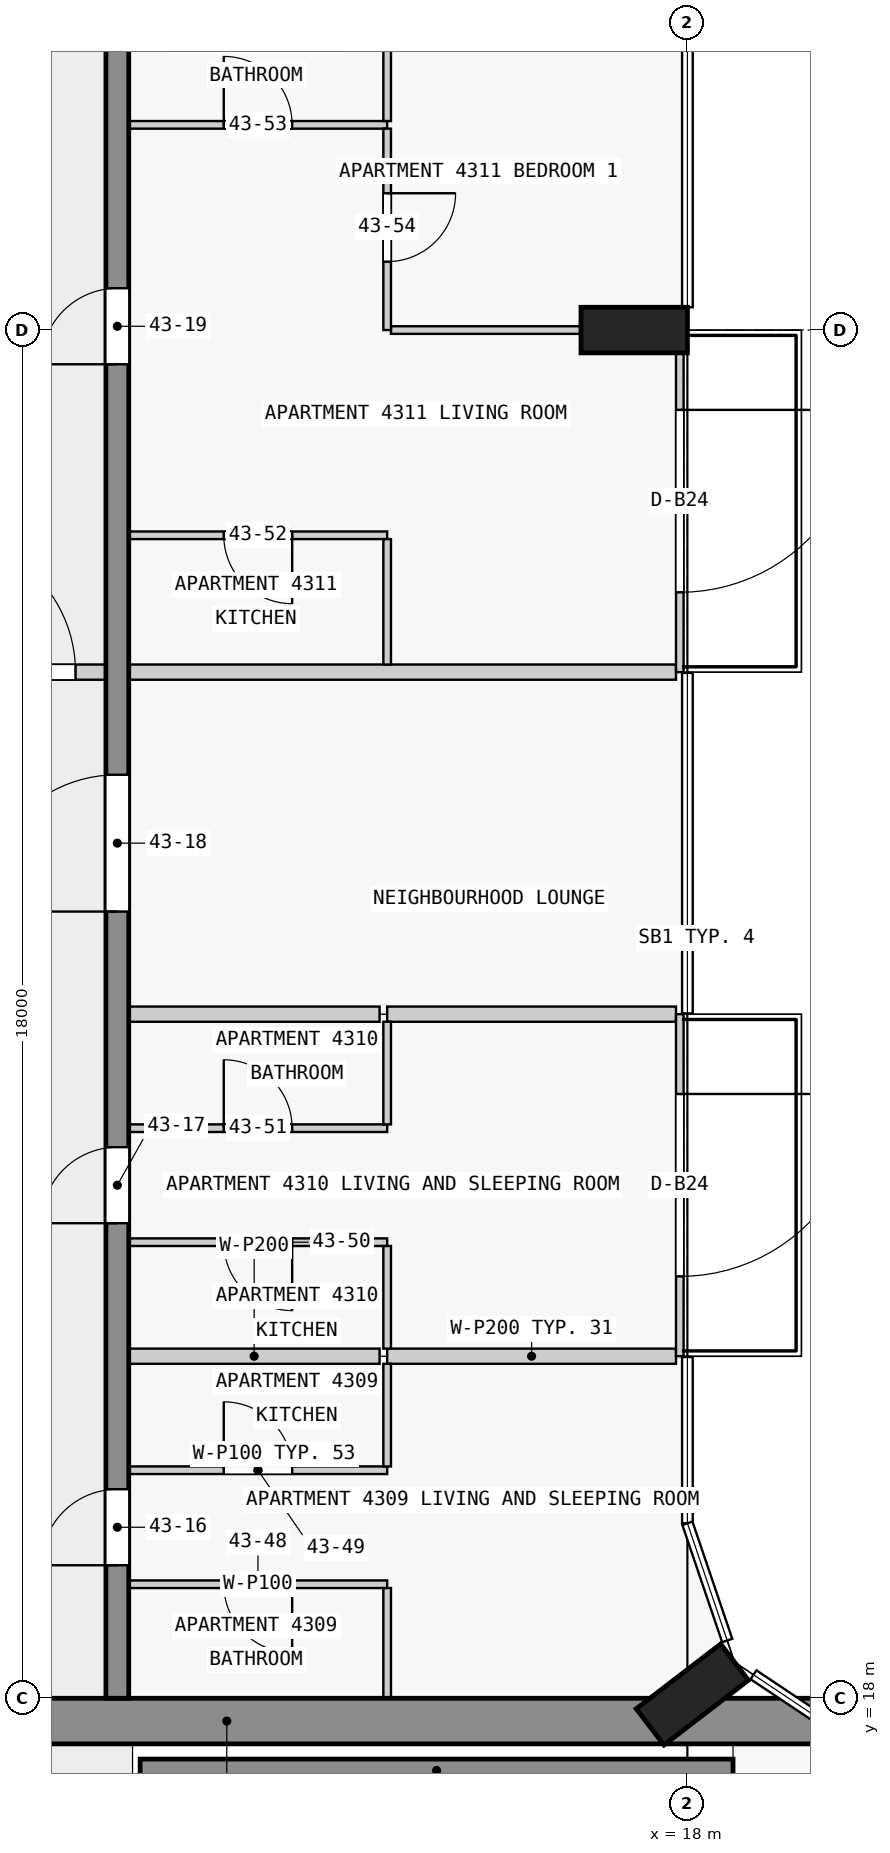
"""IFC4 building model, lengths in metres.
Left out: names, types, materials, properties, quantities, classifications, styles, units other than length and angle.
Written with IfcOpenShell. Run it as: python <this file> out.ifc"""

import sys

from ifc_helpers import new_model, si_unit, direction, frame, frame_2d, origin, origin_2d, place, context, subcontext, project, spatial, rectangle, extrude, element, fill, save


model = new_model("IFC4")
c1 = context("Model", 3, precision=1e-05, world=origin(), true_north=direction((0.0, 1.0)))
c2 = subcontext(c1, "Body", "Model", "MODEL_VIEW")
j1 = project(units=[si_unit("LENGTHUNIT", "METRE"), si_unit("PLANEANGLEUNIT", "RADIAN")], contexts=[c1])
p1 = place(None, origin())
s1 = spatial("IfcSite", under=j1, at=p1, CompositionType="ELEMENT")
p2 = place(p1, origin())
s2 = spatial("IfcBuilding", under=s1, at=p2, CompositionType="ELEMENT")
p3 = place(p2, frame((0.0, 0.0, 167.4)))
s3 = spatial("IfcBuildingStorey", under=s2, at=p3, CompositionType="ELEMENT", Elevation=167.4)
for number, where, z_axis, x_axis in (
    (1, (18.065, 18.05, 0.0), (0.0, 0.0, 1.0), (-0.609, 0.793, 0.0)),
    (2, (17.3, 36.0, 0.0), (0.0, 0.0, 1.0), (0.0, 1.0, 0.0)),
):
    element("IfcColumn", number, at=place(p3, frame(where, z_axis=z_axis, x_axis=x_axis)), inside=s3, PredefinedType="COLUMN", context=c2, shape_type="SweptSolid", body=[
        extrude(rectangle(XDim=0.6, YDim=1.4, at=origin_2d()), origin(), (0.0, 0.0, 1.0), 3.5),
    ])
p4 = place(p3, frame((1.38, 17.7, 0.0), z_axis=(0.0, 0.0, 1.0), x_axis=(1.0, 0.0, 0.0)))
e3 = element("IfcWall", 3, at=p4, inside=s3, PredefinedType="SHEAR", context=c2, shape_type="SweptSolid", body=[
    extrude(rectangle(XDim=21.12, YDim=0.6, at=frame_2d((10.56, 0.0))), origin(), (0.0, 0.0, 1.0), 3.25),
])
p5 = place(p4, frame((6.4, 0.0, 0.0)))
e4 = element("IfcOpeningElement", 4, at=p5, cuts=e3, PredefinedType="OPENING", context=c2, shape_type="SweptSolid", body=[
    extrude(rectangle(XDim=1.8, YDim=2.1, at=frame_2d((0.9, 1.05))), frame((0.0, 0.31, 0.0), z_axis=(0.0, -1.0, 0.0), x_axis=(1.0, 0.0, 0.0)), (0.0, 0.0, 1.0), 0.62),
])
p6 = place(p3, frame((10.8, 17.05, 0.0), z_axis=(0.0, 0.0, 1.0), x_axis=(1.0, 0.0, 0.0)))
e5 = element("IfcWall", 5, at=p6, inside=s3, PredefinedType="SHEAR", context=c2, shape_type="SweptSolid", body=[
    extrude(rectangle(XDim=7.8, YDim=0.3, at=frame_2d((3.9, 0.0))), origin(), (0.0, 0.0, 1.0), 3.25),
])
p7 = place(p3, frame((10.5, 18.0, 0.0), z_axis=(0.0, 0.0, 1.0), x_axis=(0.0, 1.0, 0.0)))
e6 = element("IfcWall", 6, at=p7, inside=s3, PredefinedType="SHEAR", context=c2, shape_type="SweptSolid", body=[
    extrude(rectangle(XDim=27.0, YDim=0.3, at=frame_2d((13.5, 0.0))), origin(), (0.0, 0.0, 1.0), 3.25),
])
p8 = place(p7, frame((1.75, 0.0, 0.0)))
e7 = element("IfcOpeningElement", 7, at=p8, cuts=e6, PredefinedType="OPENING", context=c2, shape_type="SweptSolid", body=[
    extrude(rectangle(XDim=1.0, YDim=2.1, at=frame_2d((0.5, 1.05))), frame((0.0, 0.16, 0.0), z_axis=(0.0, -1.0, 0.0), x_axis=(1.0, 0.0, 0.0)), (0.0, 0.0, 1.0), 0.32),
])
p9 = place(p7, frame((6.25, 0.0, 0.0)))
e8 = element("IfcOpeningElement", 8, at=p9, cuts=e6, PredefinedType="OPENING", context=c2, shape_type="SweptSolid", body=[
    extrude(rectangle(XDim=1.0, YDim=2.1, at=frame_2d((0.5, 1.05))), frame((0.0, 0.16, 0.0), z_axis=(0.0, -1.0, 0.0), x_axis=(1.0, 0.0, 0.0)), (0.0, 0.0, 1.0), 0.32),
])
p10 = place(p7, frame((10.35, 0.0, 0.0)))
e9 = element("IfcOpeningElement", 9, at=p10, cuts=e6, PredefinedType="OPENING", context=c2, shape_type="SweptSolid", body=[
    extrude(rectangle(XDim=1.8, YDim=2.1, at=frame_2d((0.9, 1.05))), frame((0.0, 0.16, 0.0), z_axis=(0.0, -1.0, 0.0), x_axis=(1.0, 0.0, 0.0)), (0.0, 0.0, 1.0), 0.32),
])
p11 = place(p7, frame((17.55, 0.0, 0.0)))
e10 = element("IfcOpeningElement", 10, at=p11, cuts=e6, PredefinedType="OPENING", context=c2, shape_type="SweptSolid", body=[
    extrude(rectangle(XDim=1.0, YDim=2.1, at=frame_2d((0.5, 1.05))), frame((0.0, 0.16, 0.0), z_axis=(0.0, -1.0, 0.0), x_axis=(1.0, 0.0, 0.0)), (0.0, 0.0, 1.0), 0.32),
])
p12 = place(p7, frame((23.25, 0.0, 0.0)))
e11 = element("IfcOpeningElement", 11, at=p12, cuts=e6, PredefinedType="OPENING", context=c2, shape_type="SweptSolid", body=[
    extrude(rectangle(XDim=0.9, YDim=2.1, at=frame_2d((0.45, 1.05))), frame((0.0, 0.16, 0.0), z_axis=(0.0, -1.0, 0.0), x_axis=(1.0, 0.0, 0.0)), (0.0, 0.0, 1.0), 0.32),
])
p13 = place(p7, frame((25.45, 0.0, 0.0)))
e12 = element("IfcOpeningElement", 12, at=p13, cuts=e6, PredefinedType="OPENING", context=c2, shape_type="SweptSolid", body=[
    extrude(rectangle(XDim=1.0, YDim=2.1, at=frame_2d((0.5, 1.05))), frame((0.0, 0.16, 0.0), z_axis=(0.0, -1.0, 0.0), x_axis=(1.0, 0.0, 0.0)), (0.0, 0.0, 1.0), 0.32),
])
p14 = place(p3, frame((17.9, 27.0, 0.0), z_axis=(0.0, 0.0, 1.0), x_axis=(0.0, -1.0, 0.0)))
e13 = element("IfcWall", 13, at=p14, inside=s3, PredefinedType="STANDARD", context=c2, shape_type="SweptSolid", body=[
    extrude(rectangle(XDim=4.5, YDim=0.1, at=frame_2d((2.25, 0.0))), origin(), (0.0, 0.0, 1.0), 3.25),
])
p15 = place(p14, frame((1.05, 0.0, 0.0)))
e14 = element("IfcOpeningElement", 14, at=p15, cuts=e13, PredefinedType="OPENING", context=c2, shape_type="SweptSolid", body=[
    extrude(rectangle(XDim=2.4, YDim=2.4, at=frame_2d((1.2, 1.2))), frame((0.0, 0.06, 0.0), z_axis=(0.0, -1.0, 0.0), x_axis=(1.0, 0.0, 0.0)), (0.0, 0.0, 1.0), 0.12),
])
p16 = place(p3, frame((17.9, 36.0, 0.0), z_axis=(0.0, 0.0, 1.0), x_axis=(0.0, -1.0, 0.0)))
e15 = element("IfcWall", 15, at=p16, inside=s3, PredefinedType="STANDARD", context=c2, shape_type="SweptSolid", body=[
    extrude(rectangle(XDim=4.5, YDim=0.1, at=frame_2d((2.25, 0.0))), origin(), (0.0, 0.0, 1.0), 3.25),
])
p17 = place(p16, frame((1.05, 0.0, 0.0)))
e16 = element("IfcOpeningElement", 16, at=p17, cuts=e15, PredefinedType="OPENING", context=c2, shape_type="SweptSolid", body=[
    extrude(rectangle(XDim=2.4, YDim=2.4, at=frame_2d((1.2, 1.2))), frame((0.0, 0.06, 0.0), z_axis=(0.0, -1.0, 0.0), x_axis=(1.0, 0.0, 0.0)), (0.0, 0.0, 1.0), 0.12),
])
p18 = place(p3, frame((14.05, 19.5, 0.0), z_axis=(0.0, 0.0, 1.0), x_axis=(-1.0, 0.0, 0.0)))
e17 = element("IfcWall", 17, at=p18, inside=s3, PredefinedType="PARTITIONING", context=c2, shape_type="SweptSolid", body=[
    extrude(rectangle(XDim=3.4, YDim=0.1, at=frame_2d((1.7, 0.0))), origin(), (0.0, 0.0, 1.0), 3.25),
])
p19 = place(p18, frame((1.25, 0.0, 0.0)))
e18 = element("IfcOpeningElement", 18, at=p19, cuts=e17, PredefinedType="OPENING", context=c2, shape_type="SweptSolid", body=[
    extrude(rectangle(XDim=0.9, YDim=2.1, at=frame_2d((0.45, 1.05))), frame((0.0, 0.06, 0.0), z_axis=(0.0, -1.0, 0.0), x_axis=(1.0, 0.0, 0.0)), (0.0, 0.0, 1.0), 0.12),
])
p20 = place(p3, frame((10.65, 21.0, 0.0), z_axis=(0.0, 0.0, 1.0), x_axis=(1.0, 0.0, 0.0)))
e19 = element("IfcWall", 19, at=p20, inside=s3, PredefinedType="PARTITIONING", context=c2, shape_type="SweptSolid", body=[
    extrude(rectangle(XDim=3.4, YDim=0.1, at=frame_2d((1.7, 0.0))), origin(), (0.0, 0.0, 1.0), 3.25),
])
p21 = place(p20, frame((1.25, 0.0, 0.0)))
e20 = element("IfcOpeningElement", 20, at=p21, cuts=e19, PredefinedType="OPENING", context=c2, shape_type="SweptSolid", body=[
    extrude(rectangle(XDim=0.9, YDim=2.1, at=frame_2d((0.45, 1.05))), frame((0.0, 0.06, 0.0), z_axis=(0.0, -1.0, 0.0), x_axis=(1.0, 0.0, 0.0)), (0.0, 0.0, 1.0), 0.12),
])
p22 = place(p3, frame((13.95, 22.5, 0.0), z_axis=(0.0, 0.0, 1.0), x_axis=(-1.0, 0.0, 0.0)))
e21 = element("IfcWall", 21, at=p22, inside=s3, PredefinedType="PARTITIONING", context=c2, shape_type="SweptSolid", body=[
    extrude(rectangle(XDim=3.3, YDim=0.2, at=frame_2d((1.65, 0.0))), origin(), (0.0, 0.0, 1.0), 3.25),
])
p23 = place(p3, frame((14.05, 22.5, 0.0), z_axis=(0.0, 0.0, 1.0), x_axis=(1.0, 0.0, 0.0)))
e22 = element("IfcWall", 22, at=p23, inside=s3, PredefinedType="PARTITIONING", context=c2, shape_type="SweptSolid", body=[
    extrude(rectangle(XDim=3.8, YDim=0.2, at=frame_2d((1.9, 0.0))), origin(), (0.0, 0.0, 1.0), 3.25),
])
p24 = place(p3, frame((14.05, 24.0, 0.0), z_axis=(0.0, 0.0, 1.0), x_axis=(-1.0, 0.0, 0.0)))
e23 = element("IfcWall", 23, at=p24, inside=s3, PredefinedType="PARTITIONING", context=c2, shape_type="SweptSolid", body=[
    extrude(rectangle(XDim=3.4, YDim=0.1, at=frame_2d((1.7, 0.0))), origin(), (0.0, 0.0, 1.0), 3.25),
])
p25 = place(p24, frame((1.25, 0.0, 0.0)))
e24 = element("IfcOpeningElement", 24, at=p25, cuts=e23, PredefinedType="OPENING", context=c2, shape_type="SweptSolid", body=[
    extrude(rectangle(XDim=0.9, YDim=2.1, at=frame_2d((0.45, 1.05))), frame((0.0, 0.06, 0.0), z_axis=(0.0, -1.0, 0.0), x_axis=(1.0, 0.0, 0.0)), (0.0, 0.0, 1.0), 0.12),
])
p26 = place(p3, frame((10.65, 25.5, 0.0), z_axis=(0.0, 0.0, 1.0), x_axis=(1.0, 0.0, 0.0)))
e25 = element("IfcWall", 25, at=p26, inside=s3, PredefinedType="PARTITIONING", context=c2, shape_type="SweptSolid", body=[
    extrude(rectangle(XDim=3.4, YDim=0.1, at=frame_2d((1.7, 0.0))), origin(), (0.0, 0.0, 1.0), 3.25),
])
p27 = place(p26, frame((1.25, 0.0, 0.0)))
e26 = element("IfcOpeningElement", 26, at=p27, cuts=e25, PredefinedType="OPENING", context=c2, shape_type="SweptSolid", body=[
    extrude(rectangle(XDim=0.9, YDim=2.1, at=frame_2d((0.45, 1.05))), frame((0.0, 0.06, 0.0), z_axis=(0.0, -1.0, 0.0), x_axis=(1.0, 0.0, 0.0)), (0.0, 0.0, 1.0), 0.12),
])
p28 = place(p3, frame((13.95, 27.0, 0.0), z_axis=(0.0, 0.0, 1.0), x_axis=(-1.0, 0.0, 0.0)))
e27 = element("IfcWall", 27, at=p28, inside=s3, PredefinedType="PARTITIONING", context=c2, shape_type="SweptSolid", body=[
    extrude(rectangle(XDim=3.3, YDim=0.2, at=frame_2d((1.65, 0.0))), origin(), (0.0, 0.0, 1.0), 3.25),
])
p29 = place(p3, frame((14.05, 27.0, 0.0), z_axis=(0.0, 0.0, 1.0), x_axis=(1.0, 0.0, 0.0)))
e28 = element("IfcWall", 28, at=p29, inside=s3, PredefinedType="PARTITIONING", context=c2, shape_type="SweptSolid", body=[
    extrude(rectangle(XDim=3.8, YDim=0.2, at=frame_2d((1.9, 0.0))), origin(), (0.0, 0.0, 1.0), 3.25),
])
p30 = place(p3, frame((17.85, 31.5, 0.0), z_axis=(0.0, 0.0, 1.0), x_axis=(-1.0, 0.0, 0.0)))
e29 = element("IfcWall", 29, at=p30, inside=s3, PredefinedType="PARTITIONING", context=c2, shape_type="SweptSolid", body=[
    extrude(rectangle(XDim=7.2, YDim=0.2, at=frame_2d((3.6, 0.0))), origin(), (0.0, 0.0, 1.0), 3.25),
])
p31 = place(p3, frame((14.05, 33.3, 0.0), z_axis=(0.0, 0.0, 1.0), x_axis=(-1.0, 0.0, 0.0)))
e30 = element("IfcWall", 30, at=p31, inside=s3, PredefinedType="PARTITIONING", context=c2, shape_type="SweptSolid", body=[
    extrude(rectangle(XDim=3.4, YDim=0.1, at=frame_2d((1.7, 0.0))), origin(), (0.0, 0.0, 1.0), 3.25),
])
p32 = place(p31, frame((1.25, 0.0, 0.0)))
e31 = element("IfcOpeningElement", 31, at=p32, cuts=e30, PredefinedType="OPENING", context=c2, shape_type="SweptSolid", body=[
    extrude(rectangle(XDim=0.9, YDim=2.1, at=frame_2d((0.45, 1.05))), frame((0.0, 0.06, 0.0), z_axis=(0.0, -1.0, 0.0), x_axis=(1.0, 0.0, 0.0)), (0.0, 0.0, 1.0), 0.12),
])
p33 = place(p3, frame((14.1, 36.0, 0.0), z_axis=(0.0, 0.0, 1.0), x_axis=(1.0, 0.0, 0.0)))
e32 = element("IfcWall", 32, at=p33, inside=s3, PredefinedType="PARTITIONING", context=c2, shape_type="SweptSolid", body=[
    extrude(rectangle(XDim=2.5, YDim=0.1, at=frame_2d((1.25, 0.0))), origin(), (0.0, 0.0, 1.0), 3.25),
])
p34 = place(p3, frame((10.65, 38.7, 0.0), z_axis=(0.0, 0.0, 1.0), x_axis=(1.0, 0.0, 0.0)))
e33 = element("IfcWall", 33, at=p34, inside=s3, PredefinedType="PARTITIONING", context=c2, shape_type="SweptSolid", body=[
    extrude(rectangle(XDim=3.4, YDim=0.1, at=frame_2d((1.7, 0.0))), origin(), (0.0, 0.0, 1.0), 3.25),
])
p35 = place(p34, frame((1.25, 0.0, 0.0)))
e34 = element("IfcOpeningElement", 34, at=p35, cuts=e33, PredefinedType="OPENING", context=c2, shape_type="SweptSolid", body=[
    extrude(rectangle(XDim=0.9, YDim=2.1, at=frame_2d((0.45, 1.05))), frame((0.0, 0.06, 0.0), z_axis=(0.0, -1.0, 0.0), x_axis=(1.0, 0.0, 0.0)), (0.0, 0.0, 1.0), 0.12),
])
p36 = place(p3, frame((14.05, 38.65, 0.0), z_axis=(0.0, 0.0, 1.0), x_axis=(0.0, -1.0, 0.0)))
e35 = element("IfcWall", 35, at=p36, inside=s3, PredefinedType="PARTITIONING", context=c2, shape_type="SweptSolid", body=[
    extrude(rectangle(XDim=2.65, YDim=0.1, at=frame_2d((1.325, 0.0))), origin(), (0.0, 0.0, 1.0), 3.25),
])
p37 = place(p36, frame((0.85, 0.0, 0.0)))
e36 = element("IfcOpeningElement", 36, at=p37, cuts=e35, PredefinedType="OPENING", context=c2, shape_type="SweptSolid", body=[
    extrude(rectangle(XDim=0.9, YDim=2.1, at=frame_2d((0.45, 1.05))), frame((0.0, 0.06, 0.0), z_axis=(0.0, -1.0, 0.0), x_axis=(1.0, 0.0, 0.0)), (0.0, 0.0, 1.0), 0.12),
])
p38 = place(p3, frame((14.05, 18.0, 0.0), z_axis=(0.0, 0.0, 1.0), x_axis=(0.0, 1.0, 0.0)))
e37 = element("IfcWall", 37, at=p38, inside=s3, PredefinedType="PARTITIONING", context=c2, shape_type="SweptSolid", body=[
    extrude(rectangle(XDim=1.45, YDim=0.1, at=frame_2d((0.725, 0.0))), origin(), (0.0, 0.0, 1.0), 3.25),
])
for number, where, z_axis, x_axis in (
    (38, (14.05, 21.05, 0.0), (0.0, 0.0, 1.0), (0.0, 1.0, 0.0)),
    (39, (14.05, 22.6, 0.0), (0.0, 0.0, 1.0), (0.0, 1.0, 0.0)),
    (40, (14.05, 25.55, 0.0), (0.0, 0.0, 1.0), (0.0, 1.0, 0.0)),
):
    element("IfcWall", number, at=place(p3, frame(where, z_axis=z_axis, x_axis=x_axis)), inside=s3, PredefinedType="PARTITIONING", context=c2, shape_type="SweptSolid", body=[
        extrude(rectangle(XDim=1.35, YDim=0.1, at=frame_2d((0.675, 0.0))), origin(), (0.0, 0.0, 1.0), 3.25),
    ])
for number, where, z_axis, x_axis in (
    (41, (14.05, 31.6, 0.0), (0.0, 0.0, 1.0), (0.0, 1.0, 0.0)),
    (42, (14.05, 38.75, 0.0), (0.0, 0.0, 1.0), (0.0, 1.0, 0.0)),
):
    element("IfcWall", number, at=place(p3, frame(where, z_axis=z_axis, x_axis=x_axis)), inside=s3, PredefinedType="PARTITIONING", context=c2, shape_type="SweptSolid", body=[
        extrude(rectangle(XDim=1.65, YDim=0.1, at=frame_2d((0.825, 0.0))), origin(), (0.0, 0.0, 1.0), 3.25),
    ])
p39 = place(p3, frame((7.45, 31.5, 0.0), z_axis=(0.0, 0.0, 1.0), x_axis=(1.0, 0.0, 0.0)))
e43 = element("IfcWall", 43, at=p39, inside=s3, PredefinedType="PARTITIONING", context=c2, shape_type="SweptSolid", body=[
    extrude(rectangle(XDim=3.1, YDim=0.2, at=frame_2d((1.55, 0.0))), origin(), (0.0, 0.0, 1.0), 3.25),
])
p40 = place(p39, frame((0.7, 0.0, 0.0)))
e44 = element("IfcOpeningElement", 44, at=p40, cuts=e43, PredefinedType="OPENING", context=c2, shape_type="SweptSolid", body=[
    extrude(rectangle(XDim=1.8, YDim=2.1, at=frame_2d((0.9, 1.05))), frame((0.0, 0.11, 0.0), z_axis=(0.0, -1.0, 0.0), x_axis=(1.0, 0.0, 0.0)), (0.0, 0.0, 1.0), 0.22),
])
p41 = place(p15, origin())
e45 = element("IfcDoor", 45, at=p41, inside=s3, OperationType="SINGLE_SWING_LEFT", PredefinedType="DOOR", context=c2, shape_type="SweptSolid", body=[
    extrude(rectangle(XDim=2.4, YDim=2.4, at=frame_2d((1.2, 1.2))), frame((0.0, 0.025, 0.0), z_axis=(0.0, -1.0, 0.0), x_axis=(1.0, 0.0, 0.0)), (0.0, 0.0, 1.0), 0.05),
])
fill(e14, e45)
p42 = place(p17, origin())
e46 = element("IfcDoor", 46, at=p42, inside=s3, OperationType="SINGLE_SWING_LEFT", PredefinedType="DOOR", context=c2, shape_type="SweptSolid", body=[
    extrude(rectangle(XDim=2.4, YDim=2.4, at=frame_2d((1.2, 1.2))), frame((0.0, 0.025, 0.0), z_axis=(0.0, -1.0, 0.0), x_axis=(1.0, 0.0, 0.0)), (0.0, 0.0, 1.0), 0.05),
])
fill(e16, e46)
p43 = place(p8, origin())
e47 = element("IfcDoor", 47, at=p43, inside=s3, OperationType="SINGLE_SWING_LEFT", PredefinedType="DOOR", context=c2, shape_type="SweptSolid", body=[
    extrude(rectangle(XDim=1.0, YDim=2.1, at=frame_2d((0.5, 1.05))), frame((0.0, 0.025, 0.0), z_axis=(0.0, -1.0, 0.0), x_axis=(1.0, 0.0, 0.0)), (0.0, 0.0, 1.0), 0.05),
])
fill(e7, e47)
p44 = place(p9, origin())
e48 = element("IfcDoor", 48, at=p44, inside=s3, OperationType="SINGLE_SWING_LEFT", PredefinedType="DOOR", context=c2, shape_type="SweptSolid", body=[
    extrude(rectangle(XDim=1.0, YDim=2.1, at=frame_2d((0.5, 1.05))), frame((0.0, 0.025, 0.0), z_axis=(0.0, -1.0, 0.0), x_axis=(1.0, 0.0, 0.0)), (0.0, 0.0, 1.0), 0.05),
])
fill(e8, e48)
p45 = place(p10, origin())
e49 = element("IfcDoor", 49, at=p45, inside=s3, OperationType="SINGLE_SWING_LEFT", PredefinedType="DOOR", context=c2, shape_type="SweptSolid", body=[
    extrude(rectangle(XDim=1.8, YDim=2.1, at=frame_2d((0.9, 1.05))), frame((0.0, 0.025, 0.0), z_axis=(0.0, -1.0, 0.0), x_axis=(1.0, 0.0, 0.0)), (0.0, 0.0, 1.0), 0.05),
])
fill(e9, e49)
p46 = place(p11, origin())
e50 = element("IfcDoor", 50, at=p46, inside=s3, OperationType="SINGLE_SWING_RIGHT", PredefinedType="DOOR", context=c2, shape_type="SweptSolid", body=[
    extrude(rectangle(XDim=1.0, YDim=2.1, at=frame_2d((0.5, 1.05))), frame((0.0, 0.025, 0.0), z_axis=(0.0, -1.0, 0.0), x_axis=(1.0, 0.0, 0.0)), (0.0, 0.0, 1.0), 0.05),
])
fill(e10, e50)
p47 = place(p40, origin())
e51 = element("IfcDoor", 51, at=p47, inside=s3, OperationType="SINGLE_SWING_RIGHT", PredefinedType="DOOR", context=c2, shape_type="SweptSolid", body=[
    extrude(rectangle(XDim=1.8, YDim=2.1, at=frame_2d((0.9, 1.05))), frame((0.0, 0.025, 0.0), z_axis=(0.0, -1.0, 0.0), x_axis=(1.0, 0.0, 0.0)), (0.0, 0.0, 1.0), 0.05),
])
fill(e44, e51)
p48 = place(p19, origin())
e52 = element("IfcDoor", 52, at=p48, inside=s3, OperationType="SINGLE_SWING_LEFT", PredefinedType="DOOR", context=c2, shape_type="SweptSolid", body=[
    extrude(rectangle(XDim=0.9, YDim=2.1, at=frame_2d((0.45, 1.05))), frame((0.0, 0.025, 0.0), z_axis=(0.0, -1.0, 0.0), x_axis=(1.0, 0.0, 0.0)), (0.0, 0.0, 1.0), 0.05),
])
fill(e18, e52)
p49 = place(p21, origin())
e53 = element("IfcDoor", 53, at=p49, inside=s3, OperationType="SINGLE_SWING_LEFT", PredefinedType="DOOR", context=c2, shape_type="SweptSolid", body=[
    extrude(rectangle(XDim=0.9, YDim=2.1, at=frame_2d((0.45, 1.05))), frame((0.0, 0.025, 0.0), z_axis=(0.0, -1.0, 0.0), x_axis=(1.0, 0.0, 0.0)), (0.0, 0.0, 1.0), 0.05),
])
fill(e20, e53)
p50 = place(p25, origin())
e54 = element("IfcDoor", 54, at=p50, inside=s3, OperationType="SINGLE_SWING_LEFT", PredefinedType="DOOR", context=c2, shape_type="SweptSolid", body=[
    extrude(rectangle(XDim=0.9, YDim=2.1, at=frame_2d((0.45, 1.05))), frame((0.0, 0.025, 0.0), z_axis=(0.0, -1.0, 0.0), x_axis=(1.0, 0.0, 0.0)), (0.0, 0.0, 1.0), 0.05),
])
fill(e24, e54)
p51 = place(p27, origin())
e55 = element("IfcDoor", 55, at=p51, inside=s3, OperationType="SINGLE_SWING_LEFT", PredefinedType="DOOR", context=c2, shape_type="SweptSolid", body=[
    extrude(rectangle(XDim=0.9, YDim=2.1, at=frame_2d((0.45, 1.05))), frame((0.0, 0.025, 0.0), z_axis=(0.0, -1.0, 0.0), x_axis=(1.0, 0.0, 0.0)), (0.0, 0.0, 1.0), 0.05),
])
fill(e26, e55)
p52 = place(p32, origin())
e56 = element("IfcDoor", 56, at=p52, inside=s3, OperationType="SINGLE_SWING_LEFT", PredefinedType="DOOR", context=c2, shape_type="SweptSolid", body=[
    extrude(rectangle(XDim=0.9, YDim=2.1, at=frame_2d((0.45, 1.05))), frame((0.0, 0.025, 0.0), z_axis=(0.0, -1.0, 0.0), x_axis=(1.0, 0.0, 0.0)), (0.0, 0.0, 1.0), 0.05),
])
fill(e31, e56)
p53 = place(p35, origin())
e57 = element("IfcDoor", 57, at=p53, inside=s3, OperationType="SINGLE_SWING_LEFT", PredefinedType="DOOR", context=c2, shape_type="SweptSolid", body=[
    extrude(rectangle(XDim=0.9, YDim=2.1, at=frame_2d((0.45, 1.05))), frame((0.0, 0.025, 0.0), z_axis=(0.0, -1.0, 0.0), x_axis=(1.0, 0.0, 0.0)), (0.0, 0.0, 1.0), 0.05),
])
fill(e34, e57)
p54 = place(p37, origin())
e58 = element("IfcDoor", 58, at=p54, inside=s3, OperationType="SINGLE_SWING_LEFT", PredefinedType="DOOR", context=c2, shape_type="SweptSolid", body=[
    extrude(rectangle(XDim=0.9, YDim=2.1, at=frame_2d((0.45, 1.05))), frame((0.0, 0.025, 0.0), z_axis=(0.0, -1.0, 0.0), x_axis=(1.0, 0.0, 0.0)), (0.0, 0.0, 1.0), 0.05),
])
fill(e36, e58)
save(model, sys.argv[1])
